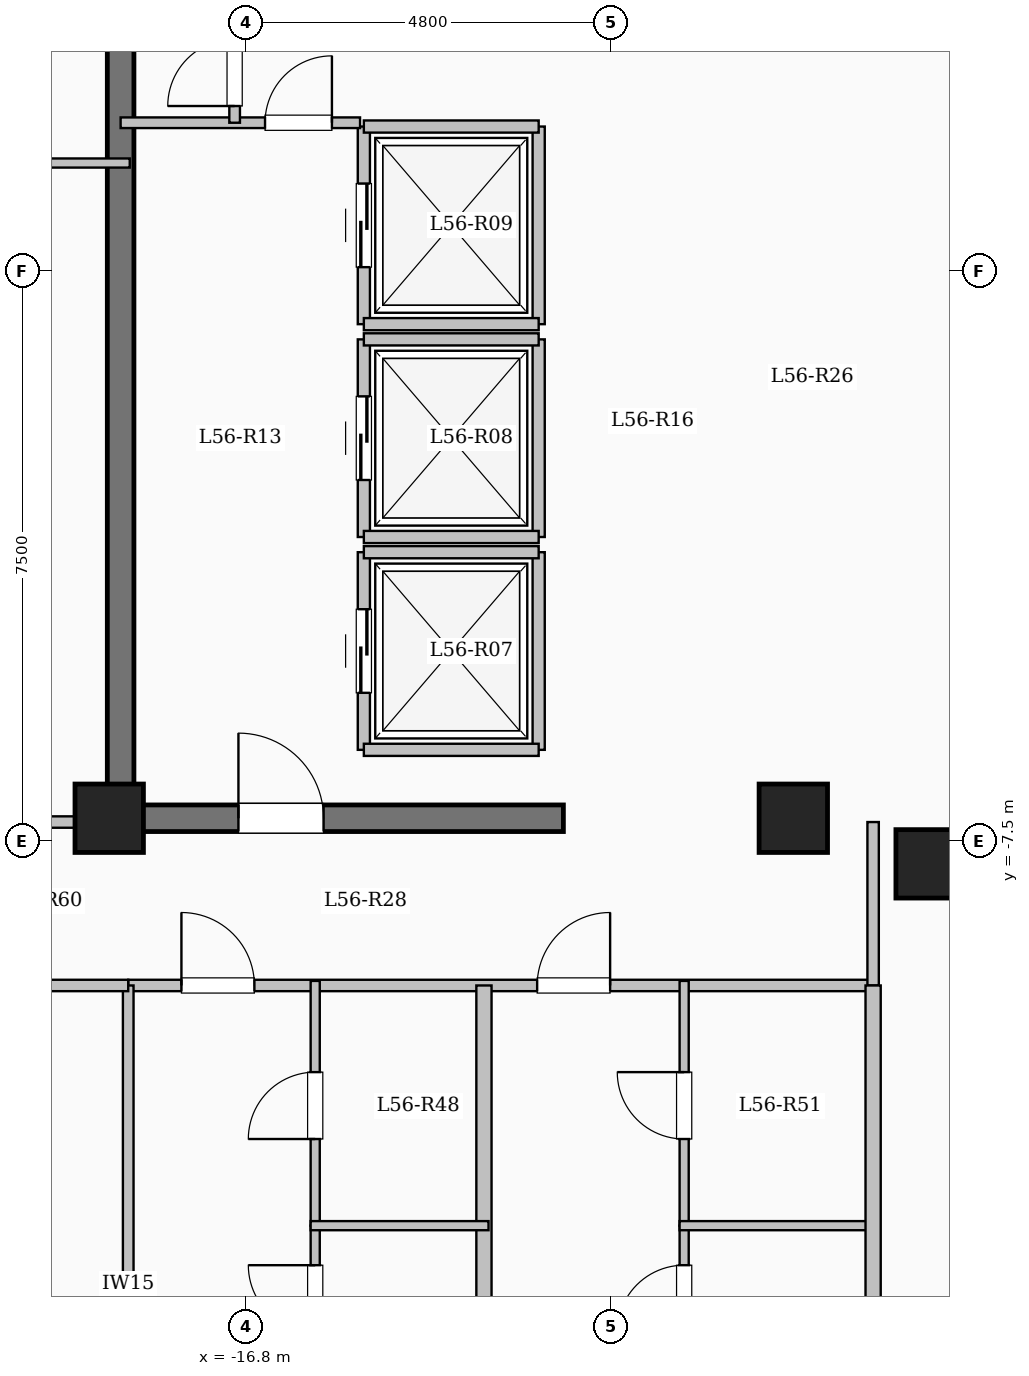
"""IFC4 building model, lengths in metres.
Left out: names, types, materials, properties, quantities, classifications, styles, units other than length and angle.
Written with IfcOpenShell. Run it as: python <this file> out.ifc"""

import sys

from ifc_helpers import new_model, si_unit, direction, frame, frame_2d, origin, origin_2d, place, context, subcontext, project, spatial, rectangle, extrude, element, fill, save


model = new_model("IFC4")
c1 = context("Model", 3, precision=1e-05, world=origin(), true_north=direction((0.0, 1.0)))
c2 = subcontext(c1, "Body", "Model", "MODEL_VIEW")
j1 = project(units=[si_unit("LENGTHUNIT", "METRE"), si_unit("PLANEANGLEUNIT", "RADIAN")], contexts=[c1])
p1 = place(None, origin())
s1 = spatial("IfcSite", under=j1, at=p1, CompositionType="ELEMENT")
p2 = place(p1, origin())
s2 = spatial("IfcBuilding", under=s1, at=p2, CompositionType="ELEMENT")
p3 = place(p2, frame((0.0, 0.0, 207.0)))
s3 = spatial("IfcBuildingStorey", under=s2, at=p3, CompositionType="ELEMENT", Elevation=207.0)
for number, where, z_axis, x_axis in (
    (1, (-7.8, -7.8, 0.0), (0.0, 0.0, 1.0), (1.0, 0.0, 0.0)),
    (2, (-9.6, -7.2, 0.0), (0.0, 0.0, 1.0), (1.0, 0.0, 0.0)),
    (3, (-18.6, -7.2, 0.0), (0.0, 0.0, 1.0), (1.0, 0.0, 0.0)),
):
    element("IfcColumn", number, at=place(p3, frame(where, z_axis=z_axis, x_axis=x_axis)), inside=s3, PredefinedType="COLUMN", context=c2, shape_type="SweptSolid", body=[
        extrude(rectangle(XDim=0.9, YDim=0.9, at=origin_2d()), origin(), (0.0, 0.0, 1.0), 3.35),
    ])
p4 = place(p3, frame((-15.25, -6.3, 0.0), z_axis=(0.0, 0.0, 1.0), x_axis=(0.0, 1.0, 0.0)))
e4 = element("IfcWall", 4, at=p4, inside=s3, PredefinedType="SOLIDWALL", context=c2, shape_type="SweptSolid", body=[
    extrude(rectangle(XDim=2.6, YDim=0.16, at=frame_2d((1.3, 0.0))), origin(), (0.0, 0.0, 1.0), 3.1),
])
p5 = place(p4, frame((0.75, 0.0, 0.0)))
e5 = element("IfcOpeningElement", 5, at=p5, cuts=e4, PredefinedType="OPENING", context=c2, shape_type="SweptSolid", body=[
    extrude(rectangle(XDim=1.1, YDim=2.15, at=frame_2d((0.55, 1.075))), frame((0.0, 0.09, 0.0), z_axis=(0.0, -1.0, 0.0), x_axis=(1.0, 0.0, 0.0)), (0.0, 0.0, 1.0), 0.18),
])
p6 = place(p3, frame((-12.95, -6.3, 0.0), z_axis=(0.0, 0.0, 1.0), x_axis=(0.0, 1.0, 0.0)))
e6 = element("IfcWall", 6, at=p6, inside=s3, PredefinedType="SOLIDWALL", context=c2, shape_type="SweptSolid", body=[
    extrude(rectangle(XDim=2.6, YDim=0.16, at=frame_2d((1.3, 0.0))), origin(), (0.0, 0.0, 1.0), 3.1),
])
for number, where, z_axis, x_axis in (
    (7, (-15.25, -6.3, 0.0), (0.0, 0.0, 1.0), (1.0, 0.0, 0.0)),
    (8, (-15.25, -3.7, 0.0), (0.0, 0.0, 1.0), (1.0, 0.0, 0.0)),
):
    element("IfcWall", number, at=place(p3, frame(where, z_axis=z_axis, x_axis=x_axis)), inside=s3, PredefinedType="SOLIDWALL", context=c2, shape_type="SweptSolid", body=[
        extrude(rectangle(XDim=2.3, YDim=0.16, at=frame_2d((1.15, 0.0))), origin(), (0.0, 0.0, 1.0), 3.1),
    ])
p7 = place(p3, frame((-15.25, -3.5, 0.0), z_axis=(0.0, 0.0, 1.0), x_axis=(0.0, 1.0, 0.0)))
e9 = element("IfcWall", 9, at=p7, inside=s3, PredefinedType="SOLIDWALL", context=c2, shape_type="SweptSolid", body=[
    extrude(rectangle(XDim=2.6, YDim=0.16, at=frame_2d((1.3, 0.0))), origin(), (0.0, 0.0, 1.0), 3.1),
])
p8 = place(p7, frame((0.75, 0.0, 0.0)))
e10 = element("IfcOpeningElement", 10, at=p8, cuts=e9, PredefinedType="OPENING", context=c2, shape_type="SweptSolid", body=[
    extrude(rectangle(XDim=1.1, YDim=2.15, at=frame_2d((0.55, 1.075))), frame((0.0, 0.09, 0.0), z_axis=(0.0, -1.0, 0.0), x_axis=(1.0, 0.0, 0.0)), (0.0, 0.0, 1.0), 0.18),
])
p9 = place(p3, frame((-12.95, -3.5, 0.0), z_axis=(0.0, 0.0, 1.0), x_axis=(0.0, 1.0, 0.0)))
e11 = element("IfcWall", 11, at=p9, inside=s3, PredefinedType="SOLIDWALL", context=c2, shape_type="SweptSolid", body=[
    extrude(rectangle(XDim=2.6, YDim=0.16, at=frame_2d((1.3, 0.0))), origin(), (0.0, 0.0, 1.0), 3.1),
])
for number, where, z_axis, x_axis in (
    (12, (-15.25, -3.5, 0.0), (0.0, 0.0, 1.0), (1.0, 0.0, 0.0)),
    (13, (-15.25, -0.9, 0.0), (0.0, 0.0, 1.0), (1.0, 0.0, 0.0)),
):
    element("IfcWall", number, at=place(p3, frame(where, z_axis=z_axis, x_axis=x_axis)), inside=s3, PredefinedType="SOLIDWALL", context=c2, shape_type="SweptSolid", body=[
        extrude(rectangle(XDim=2.3, YDim=0.16, at=frame_2d((1.15, 0.0))), origin(), (0.0, 0.0, 1.0), 3.1),
    ])
p10 = place(p3, frame((-15.25, -0.7, 0.0), z_axis=(0.0, 0.0, 1.0), x_axis=(0.0, 1.0, 0.0)))
e14 = element("IfcWall", 14, at=p10, inside=s3, PredefinedType="SOLIDWALL", context=c2, shape_type="SweptSolid", body=[
    extrude(rectangle(XDim=2.6, YDim=0.16, at=frame_2d((1.3, 0.0))), origin(), (0.0, 0.0, 1.0), 3.1),
])
p11 = place(p10, frame((0.75, 0.0, 0.0)))
e15 = element("IfcOpeningElement", 15, at=p11, cuts=e14, PredefinedType="OPENING", context=c2, shape_type="SweptSolid", body=[
    extrude(rectangle(XDim=1.1, YDim=2.15, at=frame_2d((0.55, 1.075))), frame((0.0, 0.09, 0.0), z_axis=(0.0, -1.0, 0.0), x_axis=(1.0, 0.0, 0.0)), (0.0, 0.0, 1.0), 0.18),
])
p12 = place(p3, frame((-12.95, -0.7, 0.0), z_axis=(0.0, 0.0, 1.0), x_axis=(0.0, 1.0, 0.0)))
e16 = element("IfcWall", 16, at=p12, inside=s3, PredefinedType="SOLIDWALL", context=c2, shape_type="SweptSolid", body=[
    extrude(rectangle(XDim=2.6, YDim=0.16, at=frame_2d((1.3, 0.0))), origin(), (0.0, 0.0, 1.0), 3.1),
])
for number, where, z_axis, x_axis in (
    (17, (-15.25, -0.7, 0.0), (0.0, 0.0, 1.0), (1.0, 0.0, 0.0)),
    (18, (-15.25, 1.9, 0.0), (0.0, 0.0, 1.0), (1.0, 0.0, 0.0)),
):
    element("IfcWall", number, at=place(p3, frame(where, z_axis=z_axis, x_axis=x_axis)), inside=s3, PredefinedType="SOLIDWALL", context=c2, shape_type="SweptSolid", body=[
        extrude(rectangle(XDim=2.3, YDim=0.16, at=frame_2d((1.15, 0.0))), origin(), (0.0, 0.0, 1.0), 3.1),
    ])
p13 = place(p3, frame((-18.45, -7.375, 0.0), z_axis=(0.0, 0.0, 1.0), x_axis=(0.0, 1.0, 0.0)))
e19 = element("IfcWall", 19, at=p13, inside=s3, PredefinedType="SHEAR", context=c2, shape_type="SweptSolid", body=[
    extrude(rectangle(XDim=14.05, YDim=0.35, at=frame_2d((7.025, 0.0))), origin(), (0.0, 0.0, 1.0), 3.35),
])
p14 = place(p3, frame((-18.625, -7.2, 0.0), z_axis=(0.0, 0.0, 1.0), x_axis=(1.0, 0.0, 0.0)))
e20 = element("IfcWall", 20, at=p14, inside=s3, PredefinedType="SHEAR", context=c2, shape_type="SweptSolid", body=[
    extrude(rectangle(XDim=6.0, YDim=0.35, at=frame_2d((3.0, 0.0))), origin(), (0.0, 0.0, 1.0), 3.35),
])
p15 = place(p14, frame((1.725, 0.0, 0.0)))
e21 = element("IfcOpeningElement", 21, at=p15, cuts=e20, PredefinedType="OPENING", context=c2, shape_type="SweptSolid", body=[
    extrude(rectangle(XDim=1.12, YDim=2.15, at=frame_2d((0.56, 1.075))), frame((0.0, 0.185, 0.0), z_axis=(0.0, -1.0, 0.0), x_axis=(1.0, 0.0, 0.0)), (0.0, 0.0, 1.0), 0.37),
])
p16 = place(p3, frame((-18.45, 1.95, 0.0), z_axis=(0.0, 0.0, 1.0), x_axis=(1.0, 0.0, 0.0)))
e22 = element("IfcWall", 22, at=p16, inside=s3, PredefinedType="PARTITIONING", context=c2, shape_type="SweptSolid", body=[
    extrude(rectangle(XDim=3.15, YDim=0.14, at=frame_2d((1.575, 0.0))), origin(), (0.0, 0.0, 1.0), 3.1),
])
p17 = place(p16, frame((1.9, 0.0, 0.0)))
e23 = element("IfcOpeningElement", 23, at=p17, cuts=e22, PredefinedType="OPENING", context=c2, shape_type="SweptSolid", body=[
    extrude(rectangle(XDim=0.88, YDim=2.1, at=frame_2d((0.44, 1.05))), frame((0.0, 0.08, 0.0), z_axis=(0.0, -1.0, 0.0), x_axis=(1.0, 0.0, 0.0)), (0.0, 0.0, 1.0), 0.16),
])
p18 = place(p3, frame((-16.95, 1.95, 0.0), z_axis=(0.0, 0.0, 1.0), x_axis=(0.0, 1.0, 0.0)))
e24 = element("IfcWall", 24, at=p18, inside=s3, PredefinedType="PARTITIONING", context=c2, shape_type="SweptSolid", body=[
    extrude(rectangle(XDim=1.3, YDim=0.14, at=frame_2d((0.65, 0.0))), origin(), (0.0, 0.0, 1.0), 3.1),
])
p19 = place(p18, frame((0.22, 0.0, 0.0)))
e25 = element("IfcOpeningElement", 25, at=p19, cuts=e24, PredefinedType="OPENING", context=c2, shape_type="SweptSolid", body=[
    extrude(rectangle(XDim=0.88, YDim=2.1, at=frame_2d((0.44, 1.05))), frame((0.0, 0.08, 0.0), z_axis=(0.0, -1.0, 0.0), x_axis=(1.0, 0.0, 0.0)), (0.0, 0.0, 1.0), 0.16),
])
p20 = place(p3, frame((-18.35, -9.4, 0.0), z_axis=(0.0, 0.0, 1.0), x_axis=(1.0, 0.0, 0.0)))
e26 = element("IfcWall", 26, at=p20, inside=s3, PredefinedType="PARTITIONING", context=c2, shape_type="SweptSolid", body=[
    extrude(rectangle(XDim=9.8, YDim=0.15, at=frame_2d((4.9, 0.0))), origin(), (0.0, 0.0, 1.0), 3.1),
])
p21 = place(p20, frame((0.7, 0.0, 0.0)))
e27 = element("IfcOpeningElement", 27, at=p21, cuts=e26, PredefinedType="OPENING", context=c2, shape_type="SweptSolid", body=[
    extrude(rectangle(XDim=0.96, YDim=2.15, at=frame_2d((0.48, 1.075))), frame((0.0, 0.085, 0.0), z_axis=(0.0, -1.0, 0.0), x_axis=(1.0, 0.0, 0.0)), (0.0, 0.0, 1.0), 0.17),
])
p22 = place(p20, frame((5.38, 0.0, 0.0)))
e28 = element("IfcOpeningElement", 28, at=p22, cuts=e26, PredefinedType="OPENING", context=c2, shape_type="SweptSolid", body=[
    extrude(rectangle(XDim=0.96, YDim=2.15, at=frame_2d((0.48, 1.075))), frame((0.0, 0.085, 0.0), z_axis=(0.0, -1.0, 0.0), x_axis=(1.0, 0.0, 0.0)), (0.0, 0.0, 1.0), 0.17),
])
p23 = place(p3, frame((-8.55, -9.4, 0.0), z_axis=(0.0, 0.0, 1.0), x_axis=(0.0, 1.0, 0.0)))
e29 = element("IfcWall", 29, at=p23, inside=s3, PredefinedType="PARTITIONING", context=c2, shape_type="SweptSolid", body=[
    extrude(rectangle(XDim=2.15, YDim=0.15, at=frame_2d((1.075, 0.0))), origin(), (0.0, 0.0, 1.0), 3.1),
])
p24 = place(p3, frame((-13.67, -20.9, 0.0), z_axis=(0.0, 0.0, 1.0), x_axis=(0.0, 1.0, 0.0)))
e30 = element("IfcWall", 30, at=p24, inside=s3, PredefinedType="SOLIDWALL", context=c2, shape_type="SweptSolid", body=[
    extrude(rectangle(XDim=11.5, YDim=0.2, at=frame_2d((5.75, 0.0))), origin(), (0.0, 0.0, 1.0), 3.1),
])
p25 = place(p3, frame((-15.89, -20.9, 0.0), z_axis=(0.0, 0.0, 1.0), x_axis=(0.0, 1.0, 0.0)))
e31 = element("IfcWall", 31, at=p25, inside=s3, PredefinedType="PARTITIONING", context=c2, shape_type="SweptSolid", body=[
    extrude(rectangle(XDim=8.34, YDim=0.12, at=frame_2d((4.17, 0.0))), origin(), (0.0, 0.0, 1.0), 3.1),
])
p26 = place(p25, frame((6.94, 0.0, 0.0)))
e32 = element("IfcOpeningElement", 32, at=p26, cuts=e31, PredefinedType="OPENING", context=c2, shape_type="SweptSolid", body=[
    extrude(rectangle(XDim=0.88, YDim=2.1, at=frame_2d((0.44, 1.05))), frame((0.0, 0.07, 0.0), z_axis=(0.0, -1.0, 0.0), x_axis=(1.0, 0.0, 0.0)), (0.0, 0.0, 1.0), 0.14),
])
p27 = place(p3, frame((-15.89, -12.56, 0.0), z_axis=(0.0, 0.0, 1.0), x_axis=(0.0, 1.0, 0.0)))
e33 = element("IfcWall", 33, at=p27, inside=s3, PredefinedType="PARTITIONING", context=c2, shape_type="SweptSolid", body=[
    extrude(rectangle(XDim=3.22, YDim=0.12, at=frame_2d((1.61, 0.0))), origin(), (0.0, 0.0, 1.0), 3.1),
])
p28 = place(p27, frame((1.14, 0.0, 0.0)))
e34 = element("IfcOpeningElement", 34, at=p28, cuts=e33, PredefinedType="OPENING", context=c2, shape_type="SweptSolid", body=[
    extrude(rectangle(XDim=0.88, YDim=2.1, at=frame_2d((0.44, 1.05))), frame((0.0, 0.07, 0.0), z_axis=(0.0, -1.0, 0.0), x_axis=(1.0, 0.0, 0.0)), (0.0, 0.0, 1.0), 0.14),
])
p29 = place(p3, frame((-15.95, -12.56, 0.0), z_axis=(0.0, 0.0, 1.0), x_axis=(1.0, 0.0, 0.0)))
e35 = element("IfcWall", 35, at=p29, inside=s3, PredefinedType="PARTITIONING", context=c2, shape_type="SweptSolid", body=[
    extrude(rectangle(XDim=2.34, YDim=0.12, at=frame_2d((1.17, 0.0))), origin(), (0.0, 0.0, 1.0), 2.725),
])
p30 = place(p3, frame((-11.036, -20.9, 0.0), z_axis=(0.0, 0.0, 1.0), x_axis=(0.0, 1.0, 0.0)))
e36 = element("IfcWall", 36, at=p30, inside=s3, PredefinedType="PARTITIONING", context=c2, shape_type="SweptSolid", body=[
    extrude(rectangle(XDim=8.34, YDim=0.12, at=frame_2d((4.17, 0.0))), origin(), (0.0, 0.0, 1.0), 3.1),
])
p31 = place(p30, frame((6.94, 0.0, 0.0)))
e37 = element("IfcOpeningElement", 37, at=p31, cuts=e36, PredefinedType="OPENING", context=c2, shape_type="SweptSolid", body=[
    extrude(rectangle(XDim=0.88, YDim=2.1, at=frame_2d((0.44, 1.05))), frame((0.0, 0.07, 0.0), z_axis=(0.0, -1.0, 0.0), x_axis=(1.0, 0.0, 0.0)), (0.0, 0.0, 1.0), 0.14),
])
p32 = place(p3, frame((-11.036, -12.56, 0.0), z_axis=(0.0, 0.0, 1.0), x_axis=(0.0, 1.0, 0.0)))
e38 = element("IfcWall", 38, at=p32, inside=s3, PredefinedType="PARTITIONING", context=c2, shape_type="SweptSolid", body=[
    extrude(rectangle(XDim=3.22, YDim=0.12, at=frame_2d((1.61, 0.0))), origin(), (0.0, 0.0, 1.0), 3.1),
])
p33 = place(p32, frame((1.14, 0.0, 0.0)))
e39 = element("IfcOpeningElement", 39, at=p33, cuts=e38, PredefinedType="OPENING", context=c2, shape_type="SweptSolid", body=[
    extrude(rectangle(XDim=0.88, YDim=2.1, at=frame_2d((0.44, 1.05))), frame((0.0, 0.07, 0.0), z_axis=(0.0, -1.0, 0.0), x_axis=(1.0, 0.0, 0.0)), (0.0, 0.0, 1.0), 0.14),
])
p34 = place(p3, frame((-11.096, -12.56, 0.0), z_axis=(0.0, 0.0, 1.0), x_axis=(1.0, 0.0, 0.0)))
e40 = element("IfcWall", 40, at=p34, inside=s3, PredefinedType="PARTITIONING", context=c2, shape_type="SweptSolid", body=[
    extrude(rectangle(XDim=2.556, YDim=0.12, at=frame_2d((1.278, 0.0))), origin(), (0.0, 0.0, 1.0), 2.725),
])
p35 = place(p3, frame((-8.55, -21.504, 0.0), z_axis=(0.0, 0.0, 1.0), x_axis=(0.0, 1.0, 0.0)))
e41 = element("IfcWall", 41, at=p35, inside=s3, PredefinedType="SOLIDWALL", context=c2, shape_type="SweptSolid", body=[
    extrude(rectangle(XDim=12.104, YDim=0.2, at=frame_2d((6.052, 0.0))), origin(), (0.0, 0.0, 1.0), 3.1),
])
p36 = place(p3, frame((-23.58, -7.25, 0.0), z_axis=(0.0, 0.0, 1.0), x_axis=(1.0, 0.0, 0.0)))
e42 = element("IfcWall", 42, at=p36, inside=s3, PredefinedType="PARTITIONING", context=c2, shape_type="SweptSolid", body=[
    extrude(rectangle(XDim=5.13, YDim=0.15, at=frame_2d((2.565, 0.0))), origin(), (0.0, 0.0, 1.0), 3.1),
])
p37 = place(p36, frame((2.18, 0.0, 0.0)))
e43 = element("IfcOpeningElement", 43, at=p37, cuts=e42, PredefinedType="OPENING", context=c2, shape_type="SweptSolid", body=[
    extrude(rectangle(XDim=0.96, YDim=2.15, at=frame_2d((0.48, 1.075))), frame((0.0, 0.085, 0.0), z_axis=(0.0, -1.0, 0.0), x_axis=(1.0, 0.0, 0.0)), (0.0, 0.0, 1.0), 0.17),
])
p38 = place(p3, frame((-18.35, -17.25, 0.0), z_axis=(0.0, 0.0, 1.0), x_axis=(0.0, 1.0, 0.0)))
e44 = element("IfcWall", 44, at=p38, inside=s3, PredefinedType="PARTITIONING", context=c2, shape_type="SweptSolid", body=[
    extrude(rectangle(XDim=7.85, YDim=0.14, at=frame_2d((3.925, 0.0))), origin(), (0.0, 0.0, 1.0), 3.1),
])
p39 = place(p3, frame((-23.58, -9.4, 0.0), z_axis=(0.0, 0.0, 1.0), x_axis=(1.0, 0.0, 0.0)))
e45 = element("IfcWall", 45, at=p39, inside=s3, PredefinedType="PARTITIONING", context=c2, shape_type="SweptSolid", body=[
    extrude(rectangle(XDim=5.23, YDim=0.15, at=frame_2d((2.615, 0.0))), origin(), (0.0, 0.0, 1.0), 3.1),
])
p40 = place(p39, frame((2.14, 0.0, 0.0)))
e46 = element("IfcOpeningElement", 46, at=p40, cuts=e45, PredefinedType="OPENING", context=c2, shape_type="SweptSolid", body=[
    extrude(rectangle(XDim=0.95, YDim=2.15, at=frame_2d((0.475, 1.075))), frame((0.0, 0.085, 0.0), z_axis=(0.0, -1.0, 0.0), x_axis=(1.0, 0.0, 0.0)), (0.0, 0.0, 1.0), 0.17),
])
p41 = place(p3, frame((-23.7, 1.42, 0.0), z_axis=(0.0, 0.0, 1.0), x_axis=(1.0, 0.0, 0.0)))
e47 = element("IfcWall", 47, at=p41, inside=s3, PredefinedType="PARTITIONING", context=c2, shape_type="SweptSolid", body=[
    extrude(rectangle(XDim=5.37, YDim=0.12, at=frame_2d((2.685, 0.0))), origin(), (0.0, 0.0, 1.0), 3.1),
])
p42 = place(p41, frame((0.937, 0.0, 0.0)))
e48 = element("IfcOpeningElement", 48, at=p42, cuts=e47, PredefinedType="OPENING", context=c2, shape_type="SweptSolid", body=[
    extrude(rectangle(XDim=0.88, YDim=2.1, at=frame_2d((0.44, 1.05))), frame((0.0, 0.07, 0.0), z_axis=(0.0, -1.0, 0.0), x_axis=(1.0, 0.0, 0.0)), (0.0, 0.0, 1.0), 0.14),
])
p43 = place(p41, frame((3.452, 0.0, 0.0)))
e49 = element("IfcOpeningElement", 49, at=p43, cuts=e47, PredefinedType="OPENING", context=c2, shape_type="SweptSolid", body=[
    extrude(rectangle(XDim=0.88, YDim=2.1, at=frame_2d((0.44, 1.05))), frame((0.0, 0.07, 0.0), z_axis=(0.0, -1.0, 0.0), x_axis=(1.0, 0.0, 0.0)), (0.0, 0.0, 1.0), 0.14),
])
p44 = place(p5, origin())
e50 = element("IfcDoor", 50, at=p44, inside=s3, OperationType="SLIDING_TO_LEFT", PredefinedType="DOOR", context=c2, shape_type="SweptSolid", body=[
    extrude(rectangle(XDim=1.1, YDim=2.15, at=frame_2d((0.55, 1.075))), frame((0.0, 0.025, 0.0), z_axis=(0.0, -1.0, 0.0), x_axis=(1.0, 0.0, 0.0)), (0.0, 0.0, 1.0), 0.05),
])
fill(e5, e50)
p45 = place(p8, origin())
e51 = element("IfcDoor", 51, at=p45, inside=s3, OperationType="SLIDING_TO_LEFT", PredefinedType="DOOR", context=c2, shape_type="SweptSolid", body=[
    extrude(rectangle(XDim=1.1, YDim=2.15, at=frame_2d((0.55, 1.075))), frame((0.0, 0.025, 0.0), z_axis=(0.0, -1.0, 0.0), x_axis=(1.0, 0.0, 0.0)), (0.0, 0.0, 1.0), 0.05),
])
fill(e10, e51)
p46 = place(p11, origin())
e52 = element("IfcDoor", 52, at=p46, inside=s3, OperationType="SLIDING_TO_LEFT", PredefinedType="DOOR", context=c2, shape_type="SweptSolid", body=[
    extrude(rectangle(XDim=1.1, YDim=2.15, at=frame_2d((0.55, 1.075))), frame((0.0, 0.025, 0.0), z_axis=(0.0, -1.0, 0.0), x_axis=(1.0, 0.0, 0.0)), (0.0, 0.0, 1.0), 0.05),
])
fill(e15, e52)
p47 = place(p15, origin())
e53 = element("IfcDoor", 53, at=p47, inside=s3, OperationType="SINGLE_SWING_LEFT", PredefinedType="DOOR", context=c2, shape_type="SweptSolid", body=[
    extrude(rectangle(XDim=1.12, YDim=2.15, at=frame_2d((0.56, 1.075))), frame((0.0, 0.025, 0.0), z_axis=(0.0, -1.0, 0.0), x_axis=(1.0, 0.0, 0.0)), (0.0, 0.0, 1.0), 0.05),
])
fill(e21, e53)
p48 = place(p17, origin())
e54 = element("IfcDoor", 54, at=p48, inside=s3, OperationType="SINGLE_SWING_RIGHT", PredefinedType="DOOR", context=c2, shape_type="SweptSolid", body=[
    extrude(rectangle(XDim=0.88, YDim=2.1, at=frame_2d((0.44, 1.05))), frame((0.0, 0.025, 0.0), z_axis=(0.0, -1.0, 0.0), x_axis=(1.0, 0.0, 0.0)), (0.0, 0.0, 1.0), 0.05),
])
fill(e23, e54)
p49 = place(p19, origin())
e55 = element("IfcDoor", 55, at=p49, inside=s3, OperationType="SINGLE_SWING_LEFT", PredefinedType="DOOR", context=c2, shape_type="SweptSolid", body=[
    extrude(rectangle(XDim=0.88, YDim=2.1, at=frame_2d((0.44, 1.05))), frame((0.0, 0.025, 0.0), z_axis=(0.0, -1.0, 0.0), x_axis=(1.0, 0.0, 0.0)), (0.0, 0.0, 1.0), 0.05),
])
fill(e25, e55)
p50 = place(p21, origin())
e56 = element("IfcDoor", 56, at=p50, inside=s3, OperationType="SINGLE_SWING_LEFT", PredefinedType="DOOR", context=c2, shape_type="SweptSolid", body=[
    extrude(rectangle(XDim=0.96, YDim=2.15, at=frame_2d((0.48, 1.075))), frame((0.0, 0.025, 0.0), z_axis=(0.0, -1.0, 0.0), x_axis=(1.0, 0.0, 0.0)), (0.0, 0.0, 1.0), 0.05),
])
fill(e27, e56)
p51 = place(p26, origin())
e57 = element("IfcDoor", 57, at=p51, inside=s3, OperationType="SINGLE_SWING_RIGHT", PredefinedType="DOOR", context=c2, shape_type="SweptSolid", body=[
    extrude(rectangle(XDim=0.88, YDim=2.1, at=frame_2d((0.44, 1.05))), frame((0.0, 0.025, 0.0), z_axis=(0.0, -1.0, 0.0), x_axis=(1.0, 0.0, 0.0)), (0.0, 0.0, 1.0), 0.05),
])
fill(e32, e57)
p52 = place(p28, origin())
e58 = element("IfcDoor", 58, at=p52, inside=s3, OperationType="SINGLE_SWING_LEFT", PredefinedType="DOOR", context=c2, shape_type="SweptSolid", body=[
    extrude(rectangle(XDim=0.88, YDim=2.1, at=frame_2d((0.44, 1.05))), frame((0.0, 0.025, 0.0), z_axis=(0.0, -1.0, 0.0), x_axis=(1.0, 0.0, 0.0)), (0.0, 0.0, 1.0), 0.05),
])
fill(e34, e58)
p53 = place(p22, origin())
e59 = element("IfcDoor", 59, at=p53, inside=s3, OperationType="SINGLE_SWING_RIGHT", PredefinedType="DOOR", context=c2, shape_type="SweptSolid", body=[
    extrude(rectangle(XDim=0.96, YDim=2.15, at=frame_2d((0.48, 1.075))), frame((0.0, 0.025, 0.0), z_axis=(0.0, -1.0, 0.0), x_axis=(1.0, 0.0, 0.0)), (0.0, 0.0, 1.0), 0.05),
])
fill(e28, e59)
p54 = place(p31, origin())
e60 = element("IfcDoor", 60, at=p54, inside=s3, OperationType="SINGLE_SWING_LEFT", PredefinedType="DOOR", context=c2, shape_type="SweptSolid", body=[
    extrude(rectangle(XDim=0.88, YDim=2.1, at=frame_2d((0.44, 1.05))), frame((0.0, 0.025, 0.0), z_axis=(0.0, -1.0, 0.0), x_axis=(1.0, 0.0, 0.0)), (0.0, 0.0, 1.0), 0.05),
])
fill(e37, e60)
p55 = place(p33, origin())
e61 = element("IfcDoor", 61, at=p55, inside=s3, OperationType="SINGLE_SWING_RIGHT", PredefinedType="DOOR", context=c2, shape_type="SweptSolid", body=[
    extrude(rectangle(XDim=0.88, YDim=2.1, at=frame_2d((0.44, 1.05))), frame((0.0, 0.025, 0.0), z_axis=(0.0, -1.0, 0.0), x_axis=(1.0, 0.0, 0.0)), (0.0, 0.0, 1.0), 0.05),
])
fill(e39, e61)
save(model, sys.argv[1])
